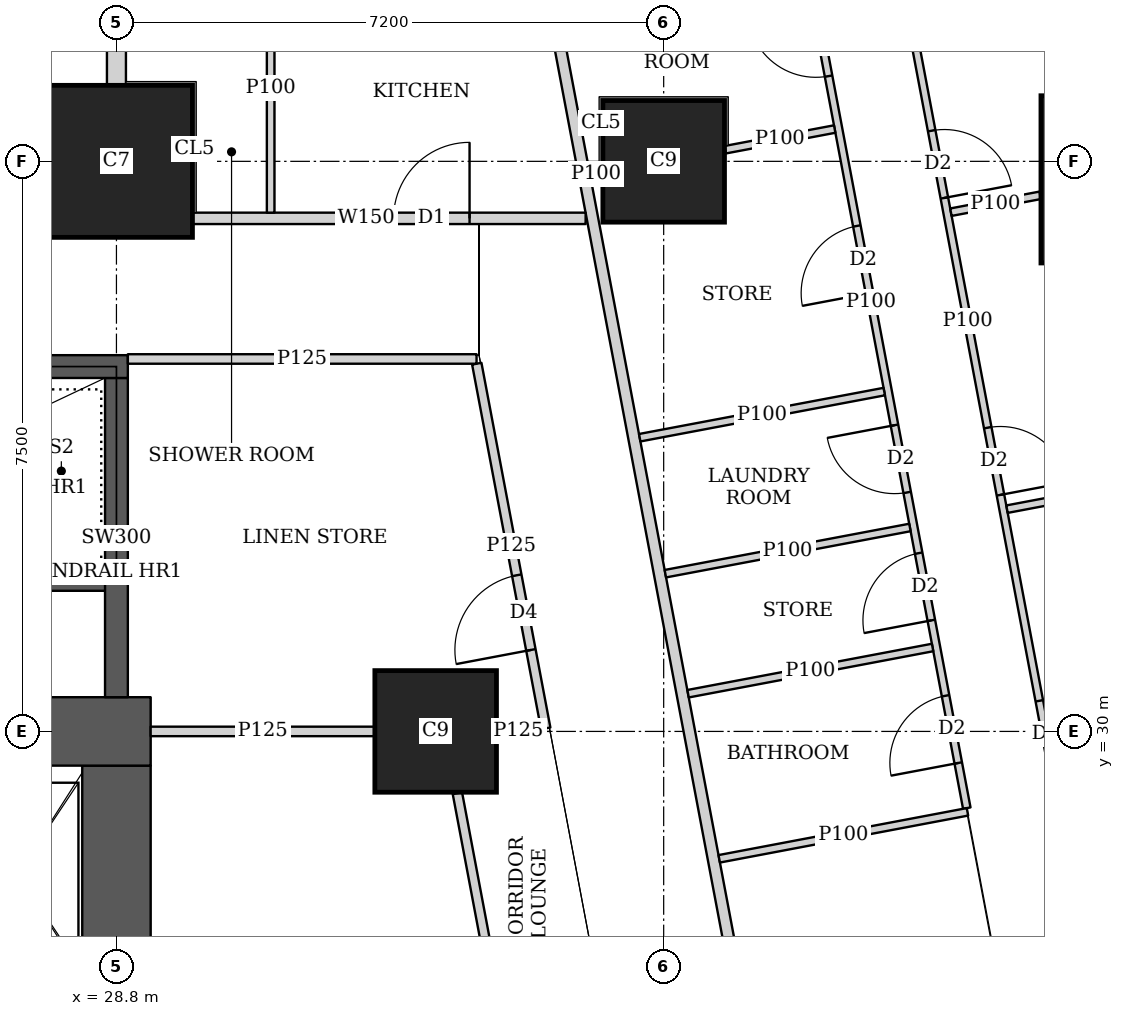
"""IFC4 building model, lengths in metres.
Left out: names, types, materials, properties, quantities, classifications, styles, units other than length and angle.
Written with IfcOpenShell. Run it as: python <this file> out.ifc"""

import sys

from ifc_helpers import new_model, si_unit, direction, frame, frame_2d, origin, origin_2d, place, context, subcontext, project, spatial, rectangle, extrude, element, fill, save


model = new_model("IFC4")
c1 = context("Model", 3, precision=1e-05, world=origin(), true_north=direction((0.0, 1.0)))
c2 = subcontext(c1, "Body", "Model", "MODEL_VIEW")
j1 = project(units=[si_unit("LENGTHUNIT", "METRE"), si_unit("PLANEANGLEUNIT", "RADIAN")], contexts=[c1])
p1 = place(None, origin())
s1 = spatial("IfcSite", under=j1, at=p1, CompositionType="ELEMENT")
p2 = place(p1, origin())
s2 = spatial("IfcBuilding", under=s1, at=p2, CompositionType="ELEMENT")
p3 = place(p2, frame((0.0, 0.0, 77.9)))
s3 = spatial("IfcBuildingStorey", under=s2, at=p3, CompositionType="ELEMENT", Elevation=77.9)
p4 = place(p3, frame((33.0, 30.0, 0.0), z_axis=(0.0, 0.0, 1.0), x_axis=(1.0, 0.0, 0.0)))
e1 = element("IfcColumn", 1, at=p4, inside=s3, PredefinedType="COLUMN", context=c2, shape_type="SweptSolid", body=[
    extrude(rectangle(XDim=1.6, YDim=1.6, at=origin_2d()), origin(), (0.0, 0.0, 1.0), 3.75),
])
p5 = place(p3, frame((28.8, 37.5, 0.0), z_axis=(0.0, 0.0, 1.0), x_axis=(1.0, 0.0, 0.0)))
e2 = element("IfcColumn", 2, at=p5, inside=s3, PredefinedType="COLUMN", context=c2, shape_type="SweptSolid", body=[
    extrude(rectangle(XDim=2.0, YDim=2.0, at=origin_2d()), origin(), (0.0, 0.0, 1.0), 3.75),
])
p6 = place(p3, frame((36.0, 37.5, 0.0), z_axis=(0.0, 0.0, 1.0), x_axis=(1.0, 0.0, 0.0)))
e3 = element("IfcColumn", 3, at=p6, inside=s3, PredefinedType="COLUMN", context=c2, shape_type="SweptSolid", body=[
    extrude(rectangle(XDim=1.6, YDim=1.6, at=origin_2d()), origin(), (0.0, 0.0, 1.0), 3.75),
])
p7 = place(p3, frame((42.064, 37.263, 0.0), z_axis=(0.0, 0.0, 1.0), x_axis=(1.0, 0.0, 0.0)))
e4 = element("IfcColumn", 4, at=p7, inside=s3, PredefinedType="COLUMN", context=c2, shape_type="SweptSolid", body=[
    extrude(rectangle(XDim=2.2, YDim=2.2, at=origin_2d()), origin(), (0.0, 0.0, 1.0), 3.75),
])
p8 = place(p3, frame((13.95, 30.0, 0.0), z_axis=(0.0, 0.0, 1.0), x_axis=(1.0, 0.0, 0.0)))
e5 = element("IfcWall", 5, at=p8, inside=s3, PredefinedType="SHEAR", context=c2, shape_type="SweptSolid", body=[
    extrude(rectangle(XDim=15.3, YDim=0.9, at=frame_2d((7.65, 0.0))), origin(), (0.0, 0.0, 1.0), 3.75),
])
p9 = place(p8, frame((4.45, 0.0, 0.0)))
e6 = element("IfcOpeningElement", 6, at=p9, cuts=e5, PredefinedType="OPENING", context=c2, shape_type="SweptSolid", body=[
    extrude(rectangle(XDim=1.8, YDim=2.1, at=frame_2d((0.9, 1.05))), frame((0.0, 0.46, 0.0), z_axis=(0.0, -1.0, 0.0), x_axis=(1.0, 0.0, 0.0)), (0.0, 0.0, 1.0), 0.92),
])
p10 = place(p8, frame((10.7, 0.0, 0.0)))
e7 = element("IfcOpeningElement", 7, at=p10, cuts=e5, PredefinedType="OPENING", context=c2, shape_type="SweptSolid", body=[
    extrude(rectangle(XDim=1.1, YDim=2.1, at=frame_2d((0.55, 1.05))), frame((0.0, 0.46, 0.0), z_axis=(0.0, -1.0, 0.0), x_axis=(1.0, 0.0, 0.0)), (0.0, 0.0, 1.0), 0.92),
])
p11 = place(p3, frame((28.8, 15.45, 0.0), z_axis=(0.0, 0.0, 1.0), x_axis=(0.0, 1.0, 0.0)))
e8 = element("IfcWall", 8, at=p11, inside=s3, PredefinedType="SHEAR", context=c2, shape_type="SweptSolid", body=[
    extrude(rectangle(XDim=14.1, YDim=0.9, at=frame_2d((7.05, 0.0))), origin(), (0.0, 0.0, 1.0), 3.75),
])
p12 = place(p3, frame((21.45, 34.8, 0.0), z_axis=(0.0, 0.0, 1.0), x_axis=(1.0, 0.0, 0.0)))
e9 = element("IfcWall", 9, at=p12, inside=s3, PredefinedType="SHEAR", context=c2, shape_type="SweptSolid", body=[
    extrude(rectangle(XDim=7.5, YDim=0.3, at=frame_2d((3.75, 0.0))), origin(), (0.0, 0.0, 1.0), 3.75),
])
p13 = place(p12, frame((0.5, 0.0, 0.0)))
e10 = element("IfcOpeningElement", 10, at=p13, cuts=e9, PredefinedType="OPENING", context=c2, shape_type="SweptSolid", body=[
    extrude(rectangle(XDim=1.1, YDim=2.1, at=frame_2d((0.55, 1.05))), frame((0.0, 0.16, 0.0), z_axis=(0.0, -1.0, 0.0), x_axis=(1.0, 0.0, 0.0)), (0.0, 0.0, 1.0), 0.32),
])
p14 = place(p3, frame((28.8, 30.45, 0.0), z_axis=(0.0, 0.0, 1.0), x_axis=(0.0, 1.0, 0.0)))
e11 = element("IfcWall", 11, at=p14, inside=s3, PredefinedType="SHEAR", context=c2, shape_type="SweptSolid", body=[
    extrude(rectangle(XDim=4.2, YDim=0.3, at=frame_2d((2.1, 0.0))), origin(), (0.0, 0.0, 1.0), 3.75),
])
p15 = place(p3, frame((29.801, 36.75, 0.0), z_axis=(0.0, 0.0, 1.0), x_axis=(1.0, 0.0, 0.0)))
e12 = element("IfcWall", 12, at=p15, inside=s3, PredefinedType="SOLIDWALL", context=c2, shape_type="SweptSolid", body=[
    extrude(rectangle(XDim=5.172, YDim=0.15, at=frame_2d((2.586, 0.0))), origin(), (0.0, 0.0, 1.0), 3.5),
])
p16 = place(p15, frame((2.645, 0.0, 0.0)))
e13 = element("IfcOpeningElement", 13, at=p16, cuts=e12, PredefinedType="OPENING", context=c2, shape_type="SweptSolid", body=[
    extrude(rectangle(XDim=1.0, YDim=2.1, at=frame_2d((0.5, 1.05))), frame((0.0, 0.085, 0.0), z_axis=(0.0, -1.0, 0.0), x_axis=(1.0, 0.0, 0.0)), (0.0, 0.0, 1.0), 0.17),
])
p17 = place(p3, frame((33.382, 45.65, 0.0), z_axis=(0.0, 0.0, 1.0), x_axis=(0.185593544777, -0.982626600565, 0.0)))
e14 = element("IfcWall", 14, at=p17, inside=s3, PredefinedType="SOLIDWALL", context=c2, shape_type="SweptSolid", body=[
    extrude(rectangle(XDim=47.118, YDim=0.15, at=frame_2d((23.559, 0.0))), origin(), (0.0, 0.0, 1.0), 2.2),
])
p18 = place(p17, frame((19.054, 0.0, 0.0)))
e15 = element("IfcOpeningElement", 15, at=p18, cuts=e14, PredefinedType="OPENING", context=c2, shape_type="SweptSolid", body=[
    extrude(rectangle(XDim=1.0, YDim=2.1, at=frame_2d((0.5, 1.05))), frame((0.0, 0.085, 0.0), z_axis=(0.0, -1.0, 0.0), x_axis=(1.0, 0.0, 0.0)), (0.0, 0.0, 1.0), 0.17),
])
p19 = place(p17, frame((22.87, 0.0, 0.0)))
e16 = element("IfcOpeningElement", 16, at=p19, cuts=e14, PredefinedType="OPENING", context=c2, shape_type="SweptSolid", body=[
    extrude(rectangle(XDim=1.0, YDim=2.1, at=frame_2d((0.5, 1.05))), frame((0.0, 0.085, 0.0), z_axis=(0.0, -1.0, 0.0), x_axis=(1.0, 0.0, 0.0)), (0.0, 0.0, 1.0), 0.17),
])
p20 = place(p17, frame((33.833, 0.0, 0.0)))
e17 = element("IfcOpeningElement", 17, at=p20, cuts=e14, PredefinedType="OPENING", context=c2, shape_type="SweptSolid", body=[
    extrude(rectangle(XDim=1.0, YDim=2.1, at=frame_2d((0.5, 1.05))), frame((0.0, 0.085, 0.0), z_axis=(0.0, -1.0, 0.0), x_axis=(1.0, 0.0, 0.0)), (0.0, 0.0, 1.0), 0.17),
])
p21 = place(p3, frame((38.862, 41.42, 0.0), z_axis=(0.0, 0.0, 1.0), x_axis=(0.185529020159, -0.982638785454, 0.0)))
e18 = element("IfcWall", 18, at=p21, inside=s3, PredefinedType="PARTITIONING", context=c2, shape_type="SweptSolid", body=[
    extrude(rectangle(XDim=12.262, YDim=0.1, at=frame_2d((6.131, 0.0))), origin(), (0.0, 0.0, 1.0), 2.5),
])
p22 = place(p21, frame((11.212, 0.0, 0.0)))
e19 = element("IfcOpeningElement", 19, at=p22, cuts=e18, PredefinedType="OPENING", context=c2, shape_type="SweptSolid", body=[
    extrude(rectangle(XDim=0.9, YDim=2.1, at=frame_2d((0.45, 1.05))), frame((0.0, 0.06, 0.0), z_axis=(0.0, -1.0, 0.0), x_axis=(1.0, 0.0, 0.0)), (0.0, 0.0, 1.0), 0.12),
])
p23 = place(p21, frame((7.555, 0.0, 0.0)))
e20 = element("IfcOpeningElement", 20, at=p23, cuts=e18, PredefinedType="OPENING", context=c2, shape_type="SweptSolid", body=[
    extrude(rectangle(XDim=0.9, YDim=2.1, at=frame_2d((0.45, 1.05))), frame((0.0, 0.06, 0.0), z_axis=(0.0, -1.0, 0.0), x_axis=(1.0, 0.0, 0.0)), (0.0, 0.0, 1.0), 0.12),
])
p24 = place(p21, frame((3.579, 0.0, 0.0)))
e21 = element("IfcOpeningElement", 21, at=p24, cuts=e18, PredefinedType="OPENING", context=c2, shape_type="SweptSolid", body=[
    extrude(rectangle(XDim=0.9, YDim=2.1, at=frame_2d((0.45, 1.05))), frame((0.0, 0.06, 0.0), z_axis=(0.0, -1.0, 0.0), x_axis=(1.0, 0.0, 0.0)), (0.0, 0.0, 1.0), 0.12),
])
p25 = place(p3, frame((37.473, 42.309, 0.0), z_axis=(0.0, 0.0, 1.0), x_axis=(0.185570636839, -0.982630927024, 0.0)))
e22 = element("IfcWall", 22, at=p25, inside=s3, PredefinedType="PARTITIONING", context=c2, shape_type="SweptSolid", body=[
    extrude(rectangle(XDim=13.553, YDim=0.1, at=frame_2d((6.777, 0.0))), origin(), (0.0, 0.0, 1.0), 2.5),
])
p26 = place(p25, frame((12.049, 0.0, 0.0)))
e23 = element("IfcOpeningElement", 23, at=p26, cuts=e22, PredefinedType="OPENING", context=c2, shape_type="SweptSolid", body=[
    extrude(rectangle(XDim=0.9, YDim=2.1, at=frame_2d((0.45, 1.05))), frame((0.0, 0.06, 0.0), z_axis=(0.0, -1.0, 0.0), x_axis=(1.0, 0.0, 0.0)), (0.0, 0.0, 1.0), 0.12),
])
p27 = place(p25, frame((8.427, 0.0, 0.0)))
e24 = element("IfcOpeningElement", 24, at=p27, cuts=e22, PredefinedType="OPENING", context=c2, shape_type="SweptSolid", body=[
    extrude(rectangle(XDim=0.9, YDim=2.1, at=frame_2d((0.45, 1.05))), frame((0.0, 0.06, 0.0), z_axis=(0.0, -1.0, 0.0), x_axis=(1.0, 0.0, 0.0)), (0.0, 0.0, 1.0), 0.12),
])
p28 = place(p25, frame((2.853, 0.0, 0.0)))
e25 = element("IfcOpeningElement", 25, at=p28, cuts=e22, PredefinedType="OPENING", context=c2, shape_type="SweptSolid", body=[
    extrude(rectangle(XDim=0.9, YDim=2.1, at=frame_2d((0.45, 1.05))), frame((0.0, 0.06, 0.0), z_axis=(0.0, -1.0, 0.0), x_axis=(1.0, 0.0, 0.0)), (0.0, 0.0, 1.0), 0.12),
])
p29 = place(p25, frame((10.14, 0.0, 0.0)))
e26 = element("IfcOpeningElement", 26, at=p29, cuts=e22, PredefinedType="OPENING", context=c2, shape_type="SweptSolid", body=[
    extrude(rectangle(XDim=0.9, YDim=2.1, at=frame_2d((0.45, 1.05))), frame((0.0, 0.06, 0.0), z_axis=(0.0, -1.0, 0.0), x_axis=(1.0, 0.0, 0.0)), (0.0, 0.0, 1.0), 0.12),
])
p30 = place(p25, frame((5.759, 0.0, 0.0)))
e27 = element("IfcOpeningElement", 27, at=p30, cuts=e22, PredefinedType="OPENING", context=c2, shape_type="SweptSolid", body=[
    extrude(rectangle(XDim=0.9, YDim=2.1, at=frame_2d((0.45, 1.05))), frame((0.0, 0.06, 0.0), z_axis=(0.0, -1.0, 0.0), x_axis=(1.0, 0.0, 0.0)), (0.0, 0.0, 1.0), 0.12),
])
p31 = place(p3, frame((40.954, 37.053, 0.0), z_axis=(0.0, 0.0, 1.0), x_axis=(-0.982628652346, -0.185582681276, 0.0)))
e28 = element("IfcWall", 28, at=p31, inside=s3, PredefinedType="PARTITIONING", context=c2, shape_type="SweptSolid", body=[
    extrude(rectangle(XDim=1.196, YDim=0.1, at=frame_2d((0.598, 0.0))), origin(), (0.0, 0.0, 1.0), 2.05),
])
p32 = place(p3, frame((44.693, 33.713, 0.0), z_axis=(0.0, 0.0, 1.0), x_axis=(-0.982623519589, -0.185609856287, 0.0)))
e29 = element("IfcWall", 29, at=p32, inside=s3, PredefinedType="PARTITIONING", context=c2, shape_type="SweptSolid", body=[
    extrude(rectangle(XDim=4.25, YDim=0.1, at=frame_2d((2.125, 0.0))), origin(), (0.0, 0.0, 1.0), 2.2),
])
p33 = place(p3, frame((38.25, 37.925, 0.0), z_axis=(0.0, 0.0, 1.0), x_axis=(-0.982626127294, -0.185596050493, 0.0)))
e30 = element("IfcWall", 30, at=p33, inside=s3, PredefinedType="PARTITIONING", context=c2, shape_type="SweptSolid", body=[
    extrude(rectangle(XDim=1.465, YDim=0.1, at=frame_2d((0.733, 0.0))), origin(), (0.0, 0.0, 1.0), 3.5),
])
p34 = place(p3, frame((35.19, 37.347, 0.0), z_axis=(0.0, 0.0, 1.0), x_axis=(-0.982404955251, -0.186763229514, 0.0)))
e31 = element("IfcWall", 31, at=p34, inside=s3, PredefinedType="PARTITIONING", context=c2, shape_type="SweptSolid", body=[
    extrude(rectangle(XDim=0.161, YDim=0.1, at=frame_2d((0.081, 0.0))), origin(), (0.0, 0.0, 1.0), 3.5),
])
p35 = place(p3, frame((39.24, 32.683, 0.0), z_axis=(0.0, 0.0, 1.0), x_axis=(-0.982607026909, -0.185697147715, 0.0)))
e32 = element("IfcWall", 32, at=p35, inside=s3, PredefinedType="PARTITIONING", context=c2, shape_type="SweptSolid", body=[
    extrude(rectangle(XDim=3.275, YDim=0.1, at=frame_2d((1.637, 0.0))), origin(), (0.0, 0.0, 1.0), 3.5),
])
p36 = place(p3, frame((39.997, 28.942, 0.0), z_axis=(0.0, 0.0, 1.0), x_axis=(-0.982569883123, -0.185893584556, 0.0)))
e33 = element("IfcWall", 33, at=p36, inside=s3, PredefinedType="PARTITIONING", context=c2, shape_type="SweptSolid", body=[
    extrude(rectangle(XDim=3.324, YDim=0.1, at=frame_2d((1.662, 0.0))), origin(), (0.0, 0.0, 1.0), 3.5),
])
p37 = place(p3, frame((39.538, 31.104, 0.0), z_axis=(0.0, 0.0, 1.0), x_axis=(-0.982610347627, -0.185679575441, 0.0)))
e34 = element("IfcWall", 34, at=p37, inside=s3, PredefinedType="PARTITIONING", context=c2, shape_type="SweptSolid", body=[
    extrude(rectangle(XDim=3.274, YDim=0.1, at=frame_2d((1.637, 0.0))), origin(), (0.0, 0.0, 1.0), 2.5),
])
p38 = place(p3, frame((38.902, 34.471, 0.0), z_axis=(0.0, 0.0, 1.0), x_axis=(-0.982664729897, -0.18539155487, 0.0)))
e35 = element("IfcWall", 35, at=p38, inside=s3, PredefinedType="PARTITIONING", context=c2, shape_type="SweptSolid", body=[
    extrude(rectangle(XDim=3.274, YDim=0.1, at=frame_2d((1.637, 0.0))), origin(), (0.0, 0.0, 1.0), 3.5),
])
p39 = place(p3, frame((30.829, 36.825, 0.0), z_axis=(0.0, 0.0, 1.0), x_axis=(0.0, 1.0, 0.0)))
e36 = element("IfcWall", 36, at=p39, inside=s3, PredefinedType="PARTITIONING", context=c2, shape_type="SweptSolid", body=[
    extrude(rectangle(XDim=3.275, YDim=0.1, at=frame_2d((1.638, 0.0))), origin(), (0.0, 0.0, 1.0), 3.5),
])
p40 = place(p3, frame((28.8, 38.501, 0.0), z_axis=(0.0, 0.0, 1.0), x_axis=(0.0, 1.0, 0.0)))
e37 = element("IfcWall", 37, at=p40, inside=s3, PredefinedType="SOLIDWALL", context=c2, shape_type="SweptSolid", body=[
    extrude(rectangle(XDim=2.849, YDim=0.25, at=frame_2d((1.425, 0.0))), origin(), (0.0, 0.0, 1.0), 3.5),
])
p41 = place(p3, frame((28.95, 34.9, 0.0), z_axis=(0.0, 0.0, 1.0), x_axis=(1.0, 0.0, 0.0)))
e38 = element("IfcWall", 38, at=p41, inside=s3, PredefinedType="PARTITIONING", context=c2, shape_type="SweptSolid", body=[
    extrude(rectangle(XDim=4.588, YDim=0.125, at=frame_2d((2.294, 0.0))), origin(), (0.0, 0.0, 1.0), 3.5),
])
p42 = place(p3, frame((34.448, 30.04, 0.0), z_axis=(0.0, 0.0, 1.0), x_axis=(-0.185749459238, 0.982597139418, 0.0)))
e39 = element("IfcWall", 39, at=p42, inside=s3, PredefinedType="PARTITIONING", context=c2, shape_type="SweptSolid", body=[
    extrude(rectangle(XDim=4.883, YDim=0.125, at=frame_2d((2.441, 0.0))), origin(), (0.0, 0.0, 1.0), 2.5),
])
p43 = place(p42, frame((1.05, 0.0, 0.0)))
e40 = element("IfcOpeningElement", 40, at=p43, cuts=e39, PredefinedType="OPENING", context=c2, shape_type="SweptSolid", body=[
    extrude(rectangle(XDim=1.0, YDim=2.1, at=frame_2d((0.5, 1.05))), frame((0.0, 0.073, 0.0), z_axis=(0.0, -1.0, 0.0), x_axis=(1.0, 0.0, 0.0)), (0.0, 0.0, 1.0), 0.145),
])
p44 = place(p3, frame((34.535, 22.574, 0.0), z_axis=(0.0, 0.0, 1.0), x_axis=(-0.185591596381, 0.982626968566, 0.0)))
e41 = element("IfcWall", 41, at=p44, inside=s3, PredefinedType="PARTITIONING", context=c2, shape_type="SweptSolid", body=[
    extrude(rectangle(XDim=6.73, YDim=0.125, at=frame_2d((3.365, 0.0))), origin(), (0.0, 0.0, 1.0), 2.5),
])
p45 = place(p44, frame((3.241, 0.0, 0.0)))
e42 = element("IfcOpeningElement", 42, at=p45, cuts=e41, PredefinedType="OPENING", context=c2, shape_type="SweptSolid", body=[
    extrude(rectangle(XDim=1.0, YDim=2.1, at=frame_2d((0.5, 1.05))), frame((0.0, 0.073, 0.0), z_axis=(0.0, -1.0, 0.0), x_axis=(1.0, 0.0, 0.0)), (0.0, 0.0, 1.0), 0.145),
])
p46 = place(p3, frame((29.25, 30.0, 0.0), z_axis=(0.0, 0.0, 1.0), x_axis=(1.0, 0.0, 0.0)))
e43 = element("IfcWall", 43, at=p46, inside=s3, PredefinedType="PARTITIONING", context=c2, shape_type="SweptSolid", body=[
    extrude(rectangle(XDim=2.949, YDim=0.125, at=frame_2d((1.475, 0.0))), origin(), (0.0, 0.0, 1.0), 3.5),
])
p47 = place(p3, frame((33.801, 30.0, 0.0), z_axis=(0.0, 0.0, 1.0), x_axis=(1.0, 0.0, 0.0)))
e44 = element("IfcWall", 44, at=p47, inside=s3, PredefinedType="PARTITIONING", context=c2, shape_type="SweptSolid", body=[
    extrude(rectangle(XDim=0.579, YDim=0.125, at=frame_2d((0.29, 0.0))), origin(), (0.0, 0.0, 1.0), 2.5),
])
p48 = place(p3, frame((23.0, 31.95, 0.0), z_axis=(0.0, 0.0, 1.0), x_axis=(1.0, 0.0, 0.0)))
e45 = element("IfcWall", 45, at=p48, inside=s3, PredefinedType="SHEAR", context=c2, shape_type="SweptSolid", body=[
    extrude(rectangle(XDim=5.8, YDim=0.2, at=frame_2d((2.9, 0.0))), origin(), (0.0, 0.0, 1.0), 3.75),
])
p49 = place(p22, origin())
e46 = element("IfcDoor", 46, at=p49, inside=s3, OperationType="SINGLE_SWING_RIGHT", PredefinedType="DOOR", context=c2, shape_type="SweptSolid", body=[
    extrude(rectangle(XDim=0.9, YDim=2.1, at=frame_2d((0.45, 1.05))), frame((0.0, 0.025, 0.0), z_axis=(0.0, -1.0, 0.0), x_axis=(1.0, 0.0, 0.0)), (0.0, 0.0, 1.0), 0.05),
])
fill(e19, e46)
p50 = place(p23, origin())
e47 = element("IfcDoor", 47, at=p50, inside=s3, OperationType="SINGLE_SWING_RIGHT", PredefinedType="DOOR", context=c2, shape_type="SweptSolid", body=[
    extrude(rectangle(XDim=0.9, YDim=2.1, at=frame_2d((0.45, 1.05))), frame((0.0, 0.025, 0.0), z_axis=(0.0, -1.0, 0.0), x_axis=(1.0, 0.0, 0.0)), (0.0, 0.0, 1.0), 0.05),
])
fill(e20, e47)
p51 = place(p24, origin())
e48 = element("IfcDoor", 48, at=p51, inside=s3, OperationType="SINGLE_SWING_RIGHT", PredefinedType="DOOR", context=c2, shape_type="SweptSolid", body=[
    extrude(rectangle(XDim=0.9, YDim=2.1, at=frame_2d((0.45, 1.05))), frame((0.0, 0.025, 0.0), z_axis=(0.0, -1.0, 0.0), x_axis=(1.0, 0.0, 0.0)), (0.0, 0.0, 1.0), 0.05),
])
fill(e21, e48)
p52 = place(p26, origin())
e49 = element("IfcDoor", 49, at=p52, inside=s3, OperationType="SINGLE_SWING_LEFT", PredefinedType="DOOR", context=c2, shape_type="SweptSolid", body=[
    extrude(rectangle(XDim=0.9, YDim=2.1, at=frame_2d((0.45, 1.05))), frame((0.0, 0.025, 0.0), z_axis=(0.0, -1.0, 0.0), x_axis=(1.0, 0.0, 0.0)), (0.0, 0.0, 1.0), 0.05),
])
fill(e23, e49)
p53 = place(p27, origin())
e50 = element("IfcDoor", 50, at=p53, inside=s3, OperationType="SINGLE_SWING_RIGHT", PredefinedType="DOOR", context=c2, shape_type="SweptSolid", body=[
    extrude(rectangle(XDim=0.9, YDim=2.1, at=frame_2d((0.45, 1.05))), frame((0.0, 0.025, 0.0), z_axis=(0.0, -1.0, 0.0), x_axis=(1.0, 0.0, 0.0)), (0.0, 0.0, 1.0), 0.05),
])
fill(e24, e50)
p54 = place(p28, origin())
e51 = element("IfcDoor", 51, at=p54, inside=s3, OperationType="SINGLE_SWING_RIGHT", PredefinedType="DOOR", context=c2, shape_type="SweptSolid", body=[
    extrude(rectangle(XDim=0.9, YDim=2.1, at=frame_2d((0.45, 1.05))), frame((0.0, 0.025, 0.0), z_axis=(0.0, -1.0, 0.0), x_axis=(1.0, 0.0, 0.0)), (0.0, 0.0, 1.0), 0.05),
])
fill(e25, e51)
p55 = place(p29, origin())
e52 = element("IfcDoor", 52, at=p55, inside=s3, OperationType="SINGLE_SWING_LEFT", PredefinedType="DOOR", context=c2, shape_type="SweptSolid", body=[
    extrude(rectangle(XDim=0.9, YDim=2.1, at=frame_2d((0.45, 1.05))), frame((0.0, 0.025, 0.0), z_axis=(0.0, -1.0, 0.0), x_axis=(1.0, 0.0, 0.0)), (0.0, 0.0, 1.0), 0.05),
])
fill(e26, e52)
p56 = place(p30, origin())
e53 = element("IfcDoor", 53, at=p56, inside=s3, OperationType="SINGLE_SWING_LEFT", PredefinedType="DOOR", context=c2, shape_type="SweptSolid", body=[
    extrude(rectangle(XDim=0.9, YDim=2.1, at=frame_2d((0.45, 1.05))), frame((0.0, 0.025, 0.0), z_axis=(0.0, -1.0, 0.0), x_axis=(1.0, 0.0, 0.0)), (0.0, 0.0, 1.0), 0.05),
])
fill(e27, e53)
p57 = place(p16, origin())
e54 = element("IfcDoor", 54, at=p57, inside=s3, OperationType="SINGLE_SWING_RIGHT", PredefinedType="DOOR", context=c2, shape_type="SweptSolid", body=[
    extrude(rectangle(XDim=1.0, YDim=2.1, at=frame_2d((0.5, 1.05))), frame((0.0, 0.025, 0.0), z_axis=(0.0, -1.0, 0.0), x_axis=(1.0, 0.0, 0.0)), (0.0, 0.0, 1.0), 0.05),
])
fill(e13, e54)
p58 = place(p43, origin())
e55 = element("IfcDoor", 55, at=p58, inside=s3, OperationType="SINGLE_SWING_LEFT", PredefinedType="DOOR", context=c2, shape_type="SweptSolid", body=[
    extrude(rectangle(XDim=1.0, YDim=2.1, at=frame_2d((0.5, 1.05))), frame((0.0, 0.025, 0.0), z_axis=(0.0, -1.0, 0.0), x_axis=(1.0, 0.0, 0.0)), (0.0, 0.0, 1.0), 0.05),
])
fill(e40, e55)
save(model, sys.argv[1])
